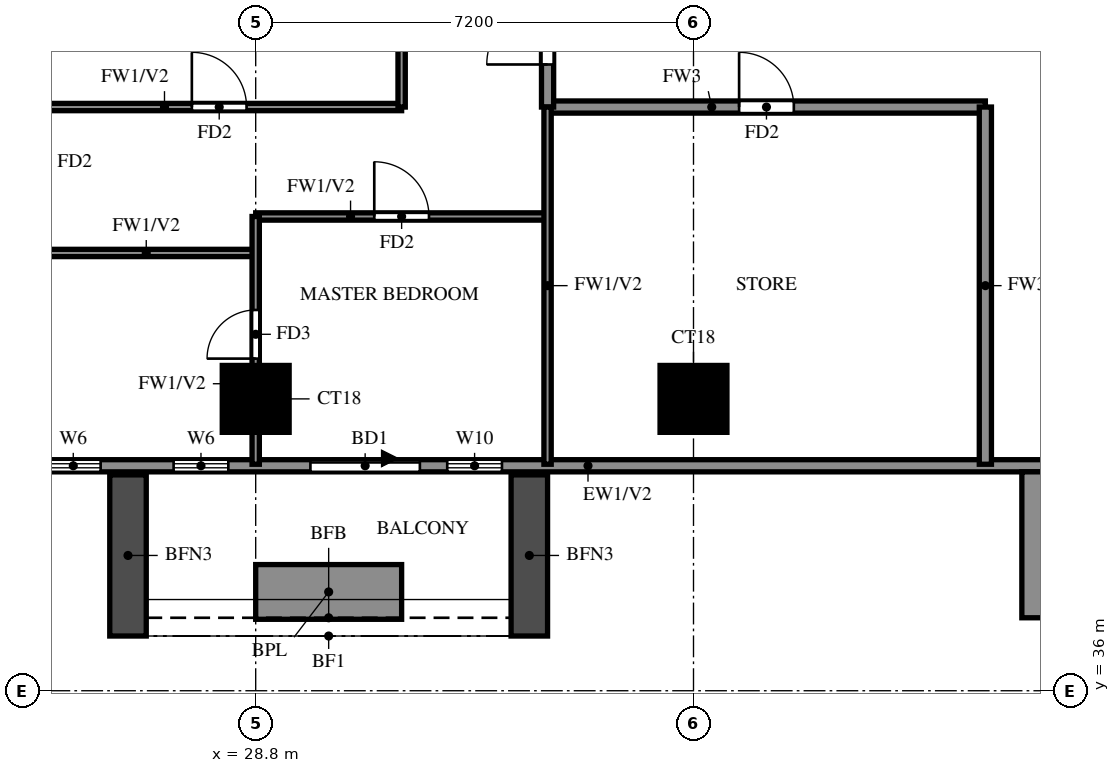
"""IFC4 building model, lengths in metres.
Left out: names, types, materials, properties, quantities, classifications, styles, units other than length and angle.
Written with IfcOpenShell. Run it as: python <this file> out.ifc"""

import sys

from ifc_helpers import new_model, si_unit, direction, frame, frame_2d, origin, origin_2d, place, context, subcontext, project, spatial, rectangle, extrude, source, transform, mapped, element, fill, save


model = new_model("IFC4")
c1 = context("Model", 3, precision=1e-05, world=origin(), true_north=direction((0.0, 1.0)))
c2 = subcontext(c1, "Body", "Model", "MODEL_VIEW")
j1 = project(units=[si_unit("LENGTHUNIT", "METRE"), si_unit("PLANEANGLEUNIT", "RADIAN")], contexts=[c1])
p1 = place(None, origin())
s1 = spatial("IfcSite", under=j1, at=p1, CompositionType="ELEMENT")
p2 = place(p1, origin())
s2 = spatial("IfcBuilding", under=s1, at=p2, CompositionType="ELEMENT")
p3 = place(p2, frame((0.0, 0.0, 123.5)))
s3 = spatial("IfcBuildingStorey", under=s2, at=p3, CompositionType="ELEMENT", Elevation=123.5)
m1 = source(origin(), c2, "Body", "SweptSolid", [
    extrude(rectangle(XDim=1.1, YDim=1.1, at=origin_2d()), origin(), (0.0, 0.0, 1.0), 3.2),
])
for number, where, z_axis, x_axis in (
    (1, (28.8, 40.8, 0.0), (0.0, 0.0, 1.0), (1.0, 0.0, 0.0)),
    (2, (36.0, 40.8, 0.0), (0.0, 0.0, 1.0), (1.0, 0.0, 0.0)),
):
    element("IfcColumn", number, at=place(p3, frame(where, z_axis=z_axis, x_axis=x_axis)), inside=s3, PredefinedType="COLUMN", context=c2, shape_type="MappedRepresentation", body=[
        mapped(m1, transform((0.0, 0.0, 0.0))),
    ])
p4 = place(p3, frame((18.2, 39.7, 0.0), z_axis=(0.0, 0.0, 1.0), x_axis=(1.0, 0.0, 0.0)))
e3 = element("IfcWall", 3, at=p4, inside=s3, PredefinedType="SOLIDWALL", context=c2, shape_type="SweptSolid", body=[
    extrude(rectangle(XDim=23.8, YDim=0.2, at=frame_2d((11.9, 0.0))), origin(), (0.0, 0.0, 1.0), 3.2),
])
p5 = place(p4, frame((11.5, 0.0, 0.0)))
e4 = element("IfcOpeningElement", 4, at=p5, cuts=e3, PredefinedType="OPENING", context=c2, shape_type="SweptSolid", body=[
    extrude(rectangle(XDim=1.8, YDim=2.4, at=frame_2d((0.9, 1.2))), frame((0.0, 0.11, 0.0), z_axis=(0.0, -1.0, 0.0), x_axis=(1.0, 0.0, 0.0)), (0.0, 0.0, 1.0), 0.22),
])
p6 = place(p4, frame((0.9, 0.0, 0.6)))
e5 = element("IfcOpeningElement", 5, at=p6, cuts=e3, PredefinedType="OPENING", context=c2, shape_type="SweptSolid", body=[
    extrude(rectangle(XDim=2.4, YDim=2.4, at=frame_2d((1.2, 1.2))), frame((0.0, 0.11, 0.0), z_axis=(0.0, -1.0, 0.0), x_axis=(1.0, 0.0, 0.0)), (0.0, 0.0, 1.0), 0.22),
])
p7 = place(p4, frame((3.9, 0.0, 0.6)))
e6 = element("IfcOpeningElement", 6, at=p7, cuts=e3, PredefinedType="OPENING", context=c2, shape_type="SweptSolid", body=[
    extrude(rectangle(XDim=2.4, YDim=2.4, at=frame_2d((1.2, 1.2))), frame((0.0, 0.11, 0.0), z_axis=(0.0, -1.0, 0.0), x_axis=(1.0, 0.0, 0.0)), (0.0, 0.0, 1.0), 0.22),
])
p8 = place(p4, frame((13.75, 0.0, 0.6)))
e7 = element("IfcOpeningElement", 7, at=p8, cuts=e3, PredefinedType="OPENING", context=c2, shape_type="SweptSolid", body=[
    extrude(rectangle(XDim=0.9, YDim=2.4, at=frame_2d((0.45, 1.2))), frame((0.0, 0.11, 0.0), z_axis=(0.0, -1.0, 0.0), x_axis=(1.0, 0.0, 0.0)), (0.0, 0.0, 1.0), 0.22),
])
p9 = place(p4, frame((7.15, 0.0, 1.5)))
e8 = element("IfcOpeningElement", 8, at=p9, cuts=e3, PredefinedType="OPENING", context=c2, shape_type="SweptSolid", body=[
    extrude(rectangle(XDim=0.9, YDim=0.9, at=frame_2d((0.45, 0.45))), frame((0.0, 0.11, 0.0), z_axis=(0.0, -1.0, 0.0), x_axis=(1.0, 0.0, 0.0)), (0.0, 0.0, 1.0), 0.22),
])
p10 = place(p4, frame((9.25, 0.0, 1.5)))
e9 = element("IfcOpeningElement", 9, at=p10, cuts=e3, PredefinedType="OPENING", context=c2, shape_type="SweptSolid", body=[
    extrude(rectangle(XDim=0.9, YDim=0.9, at=frame_2d((0.45, 0.45))), frame((0.0, 0.11, 0.0), z_axis=(0.0, -1.0, 0.0), x_axis=(1.0, 0.0, 0.0)), (0.0, 0.0, 1.0), 0.22),
])
for number, where, z_axis, x_axis in (
    (10, (26.7, 39.55, 0.0), (0.0, 0.0, 1.0), (0.0, -1.0, 0.0)),
    (11, (33.3, 39.55, 0.0), (0.0, 0.0, 1.0), (0.0, -1.0, 0.0)),
):
    element("IfcWall", number, at=place(p3, frame(where, z_axis=z_axis, x_axis=x_axis)), inside=s3, PredefinedType="SOLIDWALL", context=c2, shape_type="SweptSolid", body=[
        extrude(rectangle(XDim=2.65, YDim=0.6, at=frame_2d((1.325, 0.0))), origin(), (0.0, 0.0, 1.0), 2.85),
    ])
p11 = place(p3, frame((28.8, 37.625, 0.0), z_axis=(0.0, 0.0, 1.0), x_axis=(1.0, 0.0, 0.0)))
e12 = element("IfcWall", 12, at=p11, inside=s3, PredefinedType="SOLIDWALL", context=c2, shape_type="SweptSolid", body=[
    extrude(rectangle(XDim=2.4, YDim=0.9, at=frame_2d((1.2, 0.0))), origin(), (0.0, 0.0, 1.0), 0.9),
])
p12 = place(p3, frame((42.3, 37.2, -0.3), z_axis=(0.0, 0.0, 1.0), x_axis=(0.0, 1.0, 0.0)))
e13 = element("IfcWall", 13, at=p12, inside=s3, PredefinedType="SOLIDWALL", context=c2, shape_type="SweptSolid", body=[
    extrude(rectangle(XDim=2.4, YDim=1.8, at=frame_2d((1.2, 0.0))), origin(), (0.0, 0.0, 1.0), 3.5),
])
p13 = place(p3, frame((33.6, 45.6, 0.0), z_axis=(0.0, 0.0, 1.0), x_axis=(1.0, 0.0, 0.0)))
e14 = element("IfcWall", 14, at=p13, inside=s3, PredefinedType="SOLIDWALL", context=c2, shape_type="SweptSolid", body=[
    extrude(rectangle(XDim=7.2, YDim=0.2, at=frame_2d((3.6, 0.0))), origin(), (0.0, 0.0, 1.0), 3.2),
])
p14 = place(p13, frame((3.15, 0.0, 0.0)))
e15 = element("IfcOpeningElement", 15, at=p14, cuts=e14, PredefinedType="OPENING", context=c2, shape_type="SweptSolid", body=[
    extrude(rectangle(XDim=0.9, YDim=2.1, at=frame_2d((0.45, 1.05))), frame((0.0, 0.11, 0.0), z_axis=(0.0, -1.0, 0.0), x_axis=(1.0, 0.0, 0.0)), (0.0, 0.0, 1.0), 0.22),
])
p15 = place(p3, frame((33.6, 45.6, 0.0), z_axis=(0.0, 0.0, 1.0), x_axis=(0.0, 1.0, 0.0)))
e16 = element("IfcWall", 16, at=p15, inside=s3, PredefinedType="SOLIDWALL", context=c2, shape_type="SweptSolid", body=[
    extrude(rectangle(XDim=2.4, YDim=0.2, at=frame_2d((1.2, 0.0))), origin(), (0.0, 0.0, 1.0), 3.2),
])
p16 = place(p15, frame((0.7, 0.0, 0.0)))
e17 = element("IfcOpeningElement", 17, at=p16, cuts=e16, PredefinedType="OPENING", context=c2, shape_type="SweptSolid", body=[
    extrude(rectangle(XDim=1.0, YDim=2.1, at=frame_2d((0.5, 1.05))), frame((0.0, 0.11, 0.0), z_axis=(0.0, -1.0, 0.0), x_axis=(1.0, 0.0, 0.0)), (0.0, 0.0, 1.0), 0.22),
])
p17 = place(p3, frame((40.8, 39.725, 0.0), z_axis=(0.0, 0.0, 1.0), x_axis=(0.0, 1.0, 0.0)))
e18 = element("IfcWall", 18, at=p17, inside=s3, PredefinedType="SOLIDWALL", context=c2, shape_type="SweptSolid", body=[
    extrude(rectangle(XDim=5.875, YDim=0.2, at=frame_2d((2.938, 0.0))), origin(), (0.0, 0.0, 1.0), 3.2),
])
p18 = place(p3, frame((25.2, 43.2, 0.0), z_axis=(0.0, 0.0, 1.0), x_axis=(1.0, 0.0, 0.0)))
e19 = element("IfcWall", 19, at=p18, inside=s3, PredefinedType="PARTITIONING", context=c2, shape_type="SweptSolid", body=[
    extrude(rectangle(XDim=3.6, YDim=0.12, at=frame_2d((1.8, 0.0))), origin(), (0.0, 0.0, 1.0), 3.2),
])
p19 = place(p3, frame((28.8, 43.8, 0.0), z_axis=(0.0, 0.0, 1.0), x_axis=(1.0, 0.0, 0.0)))
e20 = element("IfcWall", 20, at=p19, inside=s3, PredefinedType="PARTITIONING", context=c2, shape_type="SweptSolid", body=[
    extrude(rectangle(XDim=4.8, YDim=0.12, at=frame_2d((2.4, 0.0))), origin(), (0.0, 0.0, 1.0), 3.2),
])
p20 = place(p19, frame((1.95, 0.0, 0.0)))
e21 = element("IfcOpeningElement", 21, at=p20, cuts=e20, PredefinedType="OPENING", context=c2, shape_type="SweptSolid", body=[
    extrude(rectangle(XDim=0.9, YDim=2.1, at=frame_2d((0.45, 1.05))), frame((0.0, 0.07, 0.0), z_axis=(0.0, -1.0, 0.0), x_axis=(1.0, 0.0, 0.0)), (0.0, 0.0, 1.0), 0.14),
])
p21 = place(p3, frame((25.2, 45.6, 0.0), z_axis=(0.0, 0.0, 1.0), x_axis=(1.0, 0.0, 0.0)))
e22 = element("IfcWall", 22, at=p21, inside=s3, PredefinedType="PARTITIONING", context=c2, shape_type="SweptSolid", body=[
    extrude(rectangle(XDim=6.0, YDim=0.12, at=frame_2d((3.0, 0.0))), origin(), (0.0, 0.0, 1.0), 3.2),
])
p22 = place(p21, frame((2.55, 0.0, 0.0)))
e23 = element("IfcOpeningElement", 23, at=p22, cuts=e22, PredefinedType="OPENING", context=c2, shape_type="SweptSolid", body=[
    extrude(rectangle(XDim=0.9, YDim=2.1, at=frame_2d((0.45, 1.05))), frame((0.0, 0.07, 0.0), z_axis=(0.0, -1.0, 0.0), x_axis=(1.0, 0.0, 0.0)), (0.0, 0.0, 1.0), 0.14),
])
p23 = place(p3, frame((28.8, 39.725, 0.0), z_axis=(0.0, 0.0, 1.0), x_axis=(0.0, 1.0, 0.0)))
e24 = element("IfcWall", 24, at=p23, inside=s3, PredefinedType="PARTITIONING", context=c2, shape_type="SweptSolid", body=[
    extrude(rectangle(XDim=4.075, YDim=0.12, at=frame_2d((2.038, 0.0))), origin(), (0.0, 0.0, 1.0), 3.2),
])
p24 = place(p23, frame((1.738, 0.0, 0.0)))
e25 = element("IfcOpeningElement", 25, at=p24, cuts=e24, PredefinedType="OPENING", context=c2, shape_type="SweptSolid", body=[
    extrude(rectangle(XDim=0.8, YDim=2.1, at=frame_2d((0.4, 1.05))), frame((0.0, 0.07, 0.0), z_axis=(0.0, -1.0, 0.0), x_axis=(1.0, 0.0, 0.0)), (0.0, 0.0, 1.0), 0.14),
])
p25 = place(p3, frame((31.2, 45.6, 0.0), z_axis=(0.0, 0.0, 1.0), x_axis=(0.0, 1.0, 0.0)))
e26 = element("IfcWall", 26, at=p25, inside=s3, PredefinedType="PARTITIONING", context=c2, shape_type="SweptSolid", body=[
    extrude(rectangle(XDim=2.4, YDim=0.12, at=frame_2d((1.2, 0.0))), origin(), (0.0, 0.0, 1.0), 3.2),
])
p26 = place(p3, frame((33.6, 39.725, 0.0), z_axis=(0.0, 0.0, 1.0), x_axis=(0.0, 1.0, 0.0)))
e27 = element("IfcWall", 27, at=p26, inside=s3, PredefinedType="PARTITIONING", context=c2, shape_type="SweptSolid", body=[
    extrude(rectangle(XDim=5.875, YDim=0.12, at=frame_2d((2.938, 0.0))), origin(), (0.0, 0.0, 1.0), 3.2),
])
p27 = place(p5, origin())
e28 = element("IfcDoor", 28, at=p27, inside=s3, OperationType="DOUBLE_DOOR_SLIDING", PredefinedType="DOOR", context=c2, shape_type="SweptSolid", body=[
    extrude(rectangle(XDim=1.8, YDim=2.4, at=frame_2d((0.9, 1.2))), frame((0.0, 0.025, 0.0), z_axis=(0.0, -1.0, 0.0), x_axis=(1.0, 0.0, 0.0)), (0.0, 0.0, 1.0), 0.05),
])
fill(e4, e28)
p28 = place(p8, origin())
e29 = element("IfcWindow", 29, at=p28, inside=s3, PartitioningType="SINGLE_PANEL", PredefinedType="WINDOW", context=c2, shape_type="SweptSolid", body=[
    extrude(rectangle(XDim=0.9, YDim=2.4, at=frame_2d((0.45, 1.2))), frame((0.0, 0.03, 0.0), z_axis=(0.0, -1.0, 0.0), x_axis=(1.0, 0.0, 0.0)), (0.0, 0.0, 1.0), 0.06),
])
fill(e7, e29)
p29 = place(p9, origin())
e30 = element("IfcWindow", 30, at=p29, inside=s3, PartitioningType="SINGLE_PANEL", PredefinedType="WINDOW", context=c2, shape_type="SweptSolid", body=[
    extrude(rectangle(XDim=0.9, YDim=0.9, at=frame_2d((0.45, 0.45))), frame((0.0, 0.03, 0.0), z_axis=(0.0, -1.0, 0.0), x_axis=(1.0, 0.0, 0.0)), (0.0, 0.0, 1.0), 0.06),
])
fill(e8, e30)
p30 = place(p10, origin())
e31 = element("IfcWindow", 31, at=p30, inside=s3, PartitioningType="SINGLE_PANEL", PredefinedType="WINDOW", context=c2, shape_type="SweptSolid", body=[
    extrude(rectangle(XDim=0.9, YDim=0.9, at=frame_2d((0.45, 0.45))), frame((0.0, 0.03, 0.0), z_axis=(0.0, -1.0, 0.0), x_axis=(1.0, 0.0, 0.0)), (0.0, 0.0, 1.0), 0.06),
])
fill(e9, e31)
p31 = place(p16, origin())
e32 = element("IfcDoor", 32, at=p31, inside=s3, OperationType="SINGLE_SWING_LEFT", PredefinedType="DOOR", context=c2, shape_type="SweptSolid", body=[
    extrude(rectangle(XDim=1.0, YDim=2.1, at=frame_2d((0.5, 1.05))), frame((0.0, 0.025, 0.0), z_axis=(0.0, -1.0, 0.0), x_axis=(1.0, 0.0, 0.0)), (0.0, 0.0, 1.0), 0.05),
])
fill(e17, e32)
p32 = place(p20, origin())
e33 = element("IfcDoor", 33, at=p32, inside=s3, OperationType="SINGLE_SWING_LEFT", PredefinedType="DOOR", context=c2, shape_type="SweptSolid", body=[
    extrude(rectangle(XDim=0.9, YDim=2.1, at=frame_2d((0.45, 1.05))), frame((0.0, 0.025, 0.0), z_axis=(0.0, -1.0, 0.0), x_axis=(1.0, 0.0, 0.0)), (0.0, 0.0, 1.0), 0.05),
])
fill(e21, e33)
p33 = place(p24, origin())
e34 = element("IfcDoor", 34, at=p33, inside=s3, OperationType="SINGLE_SWING_RIGHT", PredefinedType="DOOR", context=c2, shape_type="SweptSolid", body=[
    extrude(rectangle(XDim=0.8, YDim=2.1, at=frame_2d((0.4, 1.05))), frame((0.0, 0.025, 0.0), z_axis=(0.0, -1.0, 0.0), x_axis=(1.0, 0.0, 0.0)), (0.0, 0.0, 1.0), 0.05),
])
fill(e25, e34)
p34 = place(p22, origin())
e35 = element("IfcDoor", 35, at=p34, inside=s3, OperationType="SINGLE_SWING_RIGHT", PredefinedType="DOOR", context=c2, shape_type="SweptSolid", body=[
    extrude(rectangle(XDim=0.9, YDim=2.1, at=frame_2d((0.45, 1.05))), frame((0.0, 0.025, 0.0), z_axis=(0.0, -1.0, 0.0), x_axis=(1.0, 0.0, 0.0)), (0.0, 0.0, 1.0), 0.05),
])
fill(e23, e35)
p35 = place(p14, origin())
e36 = element("IfcDoor", 36, at=p35, inside=s3, OperationType="SINGLE_SWING_LEFT", PredefinedType="DOOR", context=c2, shape_type="SweptSolid", body=[
    extrude(rectangle(XDim=0.9, YDim=2.1, at=frame_2d((0.45, 1.05))), frame((0.0, 0.025, 0.0), z_axis=(0.0, -1.0, 0.0), x_axis=(1.0, 0.0, 0.0)), (0.0, 0.0, 1.0), 0.05),
])
fill(e15, e36)
save(model, sys.argv[1])
